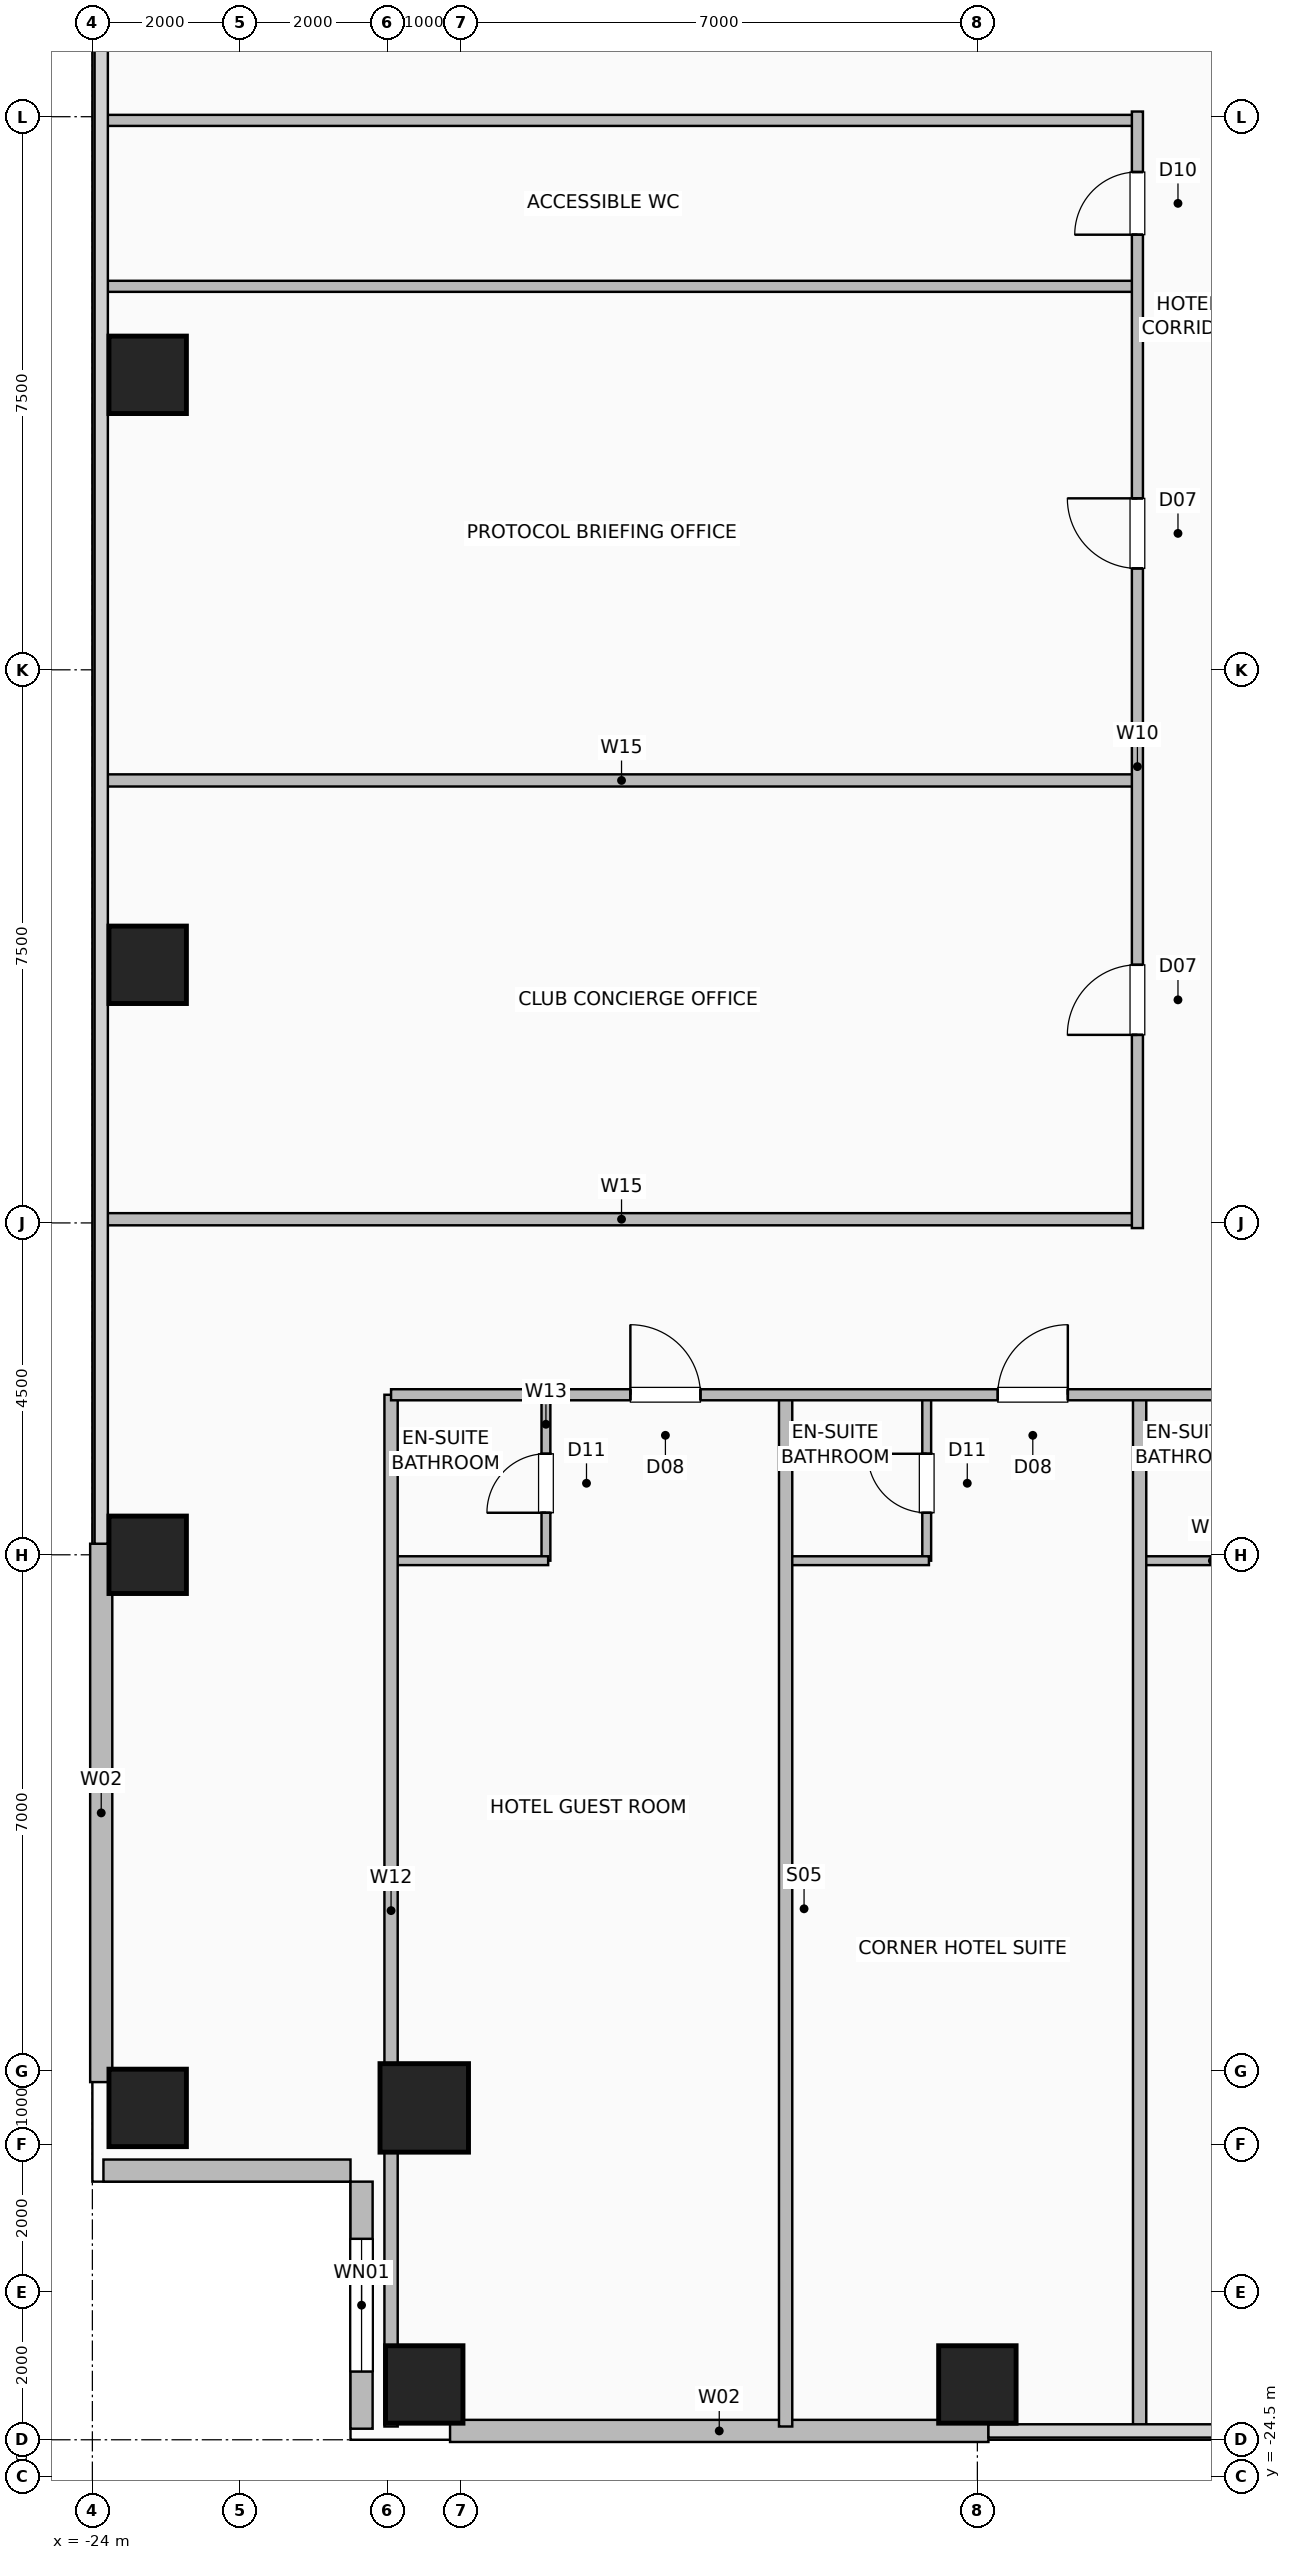
"""IFC4 building model, lengths in metres.
Left out: names, types, materials, properties, quantities, classifications, styles, units other than length and angle.
Written with IfcOpenShell. Run it as: python <this file> out.ifc"""

import sys

from ifc_helpers import new_model, si_unit, direction, frame, frame_2d, origin, origin_2d, place, context, subcontext, project, spatial, rectangle, hollow_rectangle, extrude, element, fill, save


model = new_model("IFC4")
c1 = context("Model", 3, precision=1e-05, world=origin(), true_north=direction((0.0, 1.0)))
c2 = subcontext(c1, "Body", "Model", "MODEL_VIEW")
j1 = project(units=[si_unit("LENGTHUNIT", "METRE"), si_unit("PLANEANGLEUNIT", "RADIAN")], contexts=[c1])
p1 = place(None, origin())
s1 = spatial("IfcSite", under=j1, at=p1, CompositionType="ELEMENT")
p2 = place(p1, origin())
s2 = spatial("IfcBuilding", under=s1, at=p2, CompositionType="ELEMENT")
p3 = place(p2, frame((0.0, 0.0, 65.5)))
s3 = spatial("IfcBuildingStorey", under=s2, at=p3, CompositionType="ELEMENT", Elevation=65.5)
for number, where, z_axis, x_axis in (
    (1, (-19.5, -23.25, 0.0), (0.0, 0.0, 1.0), (1.0, 0.0, 0.0)),
    (2, (-23.25, -19.5, 0.0), (0.0, 0.0, 1.0), (1.0, 0.0, 0.0)),
    (3, (-12.0, -23.25, 0.0), (0.0, 0.0, 1.0), (1.0, 0.0, 0.0)),
    (4, (-23.25, -12.0, 0.0), (0.0, 0.0, 1.0), (1.0, 0.0, 0.0)),
    (5, (-23.25, -4.0, 0.0), (0.0, 0.0, 1.0), (1.0, 0.0, 0.0)),
    (6, (-23.25, 4.0, 0.0), (0.0, 0.0, 1.0), (1.0, 0.0, 0.0)),
):
    element("IfcColumn", number, at=place(p3, frame(where, z_axis=z_axis, x_axis=x_axis)), inside=s3, PredefinedType="COLUMN", context=c2, shape_type="SweptSolid", body=[
        extrude(hollow_rectangle(XDim=1.05, YDim=1.05, WallThickness=0.05, at=origin_2d()), origin(), (0.0, 0.0, 1.0), 3.5),
    ])
p4 = place(p3, frame((-19.5, -19.5, 0.0), z_axis=(0.0, 0.0, 1.0), x_axis=(1.0, 0.0, 0.0)))
e7 = element("IfcColumn", 7, at=p4, inside=s3, PredefinedType="COLUMN", context=c2, shape_type="SweptSolid", body=[
    extrude(hollow_rectangle(XDim=1.2, YDim=1.2, WallThickness=0.055, at=origin_2d()), origin(), (0.0, 0.0, 1.0), 3.5),
])
for number, where, z_axis, x_axis in (
    (8, (-19.15, -23.88, 0.0), (0.0, 0.0, 1.0), (1.0, 0.0, 0.0)),
    (9, (-23.88, -19.15, 0.0), (0.0, 0.0, 1.0), (0.0, 1.0, 0.0)),
):
    element("IfcWall", number, at=place(p3, frame(where, z_axis=z_axis, x_axis=x_axis)), inside=s3, PredefinedType="SOLIDWALL", context=c2, shape_type="SweptSolid", body=[
        extrude(rectangle(XDim=7.3, YDim=0.3, at=frame_2d((3.65, 0.0))), origin(), (0.0, 0.0, 1.0), 3.25),
    ])
p5 = place(p3, frame((-20.35, -23.85, 0.0), z_axis=(0.0, 0.0, 1.0), x_axis=(0.0, 1.0, 0.0)))
e10 = element("IfcWall", 10, at=p5, inside=s3, PredefinedType="SOLIDWALL", context=c2, shape_type="SweptSolid", body=[
    extrude(rectangle(XDim=3.35, YDim=0.3, at=frame_2d((1.675, 0.0))), origin(), (0.0, 0.0, 1.0), 3.25),
])
p6 = place(p5, frame((0.775, 0.0, 0.9)))
e11 = element("IfcOpeningElement", 11, at=p6, cuts=e10, PredefinedType="OPENING", context=c2, shape_type="SweptSolid", body=[
    extrude(rectangle(XDim=1.8, YDim=1.8, at=frame_2d((0.9, 0.9))), frame((0.0, 0.16, 0.0), z_axis=(0.0, -1.0, 0.0), x_axis=(1.0, 0.0, 0.0)), (0.0, 0.0, 1.0), 0.32),
])
p7 = place(p3, frame((-23.85, -20.35, 0.0), z_axis=(0.0, 0.0, 1.0), x_axis=(1.0, 0.0, 0.0)))
e12 = element("IfcWall", 12, at=p7, inside=s3, PredefinedType="SOLIDWALL", context=c2, shape_type="SweptSolid", body=[
    extrude(rectangle(XDim=3.35, YDim=0.3, at=frame_2d((1.675, 0.0))), origin(), (0.0, 0.0, 1.0), 3.25),
])
p8 = place(p3, frame((-17.85, -12.08, 0.0), z_axis=(0.0, 0.0, 1.0), x_axis=(0.0, 1.0, 0.0)))
e13 = element("IfcWall", 13, at=p8, inside=s3, PredefinedType="PLUMBINGWALL", context=c2, shape_type="SweptSolid", body=[
    extrude(rectangle(XDim=2.25, YDim=0.12, at=frame_2d((1.125, 0.0))), origin(), (0.0, 0.0, 1.0), 3.25),
])
p9 = place(p8, frame((0.65, 0.0, 0.0)))
e14 = element("IfcOpeningElement", 14, at=p9, cuts=e13, PredefinedType="OPENING", context=c2, shape_type="SweptSolid", body=[
    extrude(rectangle(XDim=0.8, YDim=2.05, at=frame_2d((0.4, 1.025))), frame((0.0, 0.07, 0.0), z_axis=(0.0, -1.0, 0.0), x_axis=(1.0, 0.0, 0.0)), (0.0, 0.0, 1.0), 0.14),
])
p10 = place(p3, frame((-19.92, -12.08, 0.0), z_axis=(0.0, 0.0, 1.0), x_axis=(1.0, 0.0, 0.0)))
e15 = element("IfcWall", 15, at=p10, inside=s3, PredefinedType="PLUMBINGWALL", context=c2, shape_type="SweptSolid", body=[
    extrude(rectangle(XDim=2.1, YDim=0.12, at=frame_2d((1.05, 0.0))), origin(), (0.0, 0.0, 1.0), 3.25),
])
p11 = place(p3, frame((-12.687, -12.08, 0.0), z_axis=(0.0, 0.0, 1.0), x_axis=(0.0, 1.0, 0.0)))
e16 = element("IfcWall", 16, at=p11, inside=s3, PredefinedType="PLUMBINGWALL", context=c2, shape_type="SweptSolid", body=[
    extrude(rectangle(XDim=2.25, YDim=0.12, at=frame_2d((1.125, 0.0))), origin(), (0.0, 0.0, 1.0), 3.25),
])
p12 = place(p11, frame((0.65, 0.0, 0.0)))
e17 = element("IfcOpeningElement", 17, at=p12, cuts=e16, PredefinedType="OPENING", context=c2, shape_type="SweptSolid", body=[
    extrude(rectangle(XDim=0.8, YDim=2.05, at=frame_2d((0.4, 1.025))), frame((0.0, 0.07, 0.0), z_axis=(0.0, -1.0, 0.0), x_axis=(1.0, 0.0, 0.0)), (0.0, 0.0, 1.0), 0.14),
])
for number, where, z_axis, x_axis in (
    (18, (-14.57, -12.08, 0.0), (0.0, 0.0, 1.0), (1.0, 0.0, 0.0)),
    (19, (-9.77, -12.08, 0.0), (0.0, 0.0, 1.0), (1.0, 0.0, 0.0)),
):
    element("IfcWall", number, at=place(p3, frame(where, z_axis=z_axis, x_axis=x_axis)), inside=s3, PredefinedType="PLUMBINGWALL", context=c2, shape_type="SweptSolid", body=[
        extrude(rectangle(XDim=1.913, YDim=0.12, at=frame_2d((0.957, 0.0))), origin(), (0.0, 0.0, 1.0), 3.25),
    ])
for number, where, z_axis, x_axis in (
    (20, (-19.95, -23.82, 0.0), (0.0, 0.0, 1.0), (0.0, 1.0, 0.0)),
    (21, (-14.6, -23.82, 0.0), (0.0, 0.0, 1.0), (0.0, 1.0, 0.0)),
    (22, (-9.8, -23.82, 0.0), (0.0, 0.0, 1.0), (0.0, 1.0, 0.0)),
):
    element("IfcWall", number, at=place(p3, frame(where, z_axis=z_axis, x_axis=x_axis)), inside=s3, PredefinedType="PARTITIONING", context=c2, shape_type="SweptSolid", body=[
        extrude(rectangle(XDim=13.99, YDim=0.18, at=frame_2d((6.995, 0.0))), origin(), (0.0, 0.0, 1.0), 3.25),
    ])
p13 = place(p3, frame((-19.95, -9.83, 0.0), z_axis=(0.0, 0.0, 1.0), x_axis=(1.0, 0.0, 0.0)))
e23 = element("IfcWall", 23, at=p13, inside=s3, PredefinedType="PARTITIONING", context=c2, shape_type="SweptSolid", body=[
    extrude(rectangle(XDim=39.9, YDim=0.15, at=frame_2d((19.95, 0.0))), origin(), (0.0, 0.0, 1.0), 3.25),
])
p14 = place(p13, frame((3.245, 0.0, 0.0)))
e24 = element("IfcOpeningElement", 24, at=p14, cuts=e23, PredefinedType="OPENING", context=c2, shape_type="SweptSolid", body=[
    extrude(rectangle(XDim=0.95, YDim=2.08, at=frame_2d((0.475, 1.04))), frame((0.0, 0.085, 0.0), z_axis=(0.0, -1.0, 0.0), x_axis=(1.0, 0.0, 0.0)), (0.0, 0.0, 1.0), 0.17),
])
p15 = place(p13, frame((8.227, 0.0, 0.0)))
e25 = element("IfcOpeningElement", 25, at=p15, cuts=e23, PredefinedType="OPENING", context=c2, shape_type="SweptSolid", body=[
    extrude(rectangle(XDim=0.95, YDim=2.08, at=frame_2d((0.475, 1.04))), frame((0.0, 0.085, 0.0), z_axis=(0.0, -1.0, 0.0), x_axis=(1.0, 0.0, 0.0)), (0.0, 0.0, 1.0), 0.17),
])
p16 = place(p13, frame((13.027, 0.0, 0.0)))
e26 = element("IfcOpeningElement", 26, at=p16, cuts=e23, PredefinedType="OPENING", context=c2, shape_type="SweptSolid", body=[
    extrude(rectangle(XDim=0.95, YDim=2.08, at=frame_2d((0.475, 1.04))), frame((0.0, 0.085, 0.0), z_axis=(0.0, -1.0, 0.0), x_axis=(1.0, 0.0, 0.0)), (0.0, 0.0, 1.0), 0.17),
])
p17 = place(p13, frame((16.861, 0.0, 0.0)))
e27 = element("IfcOpeningElement", 27, at=p17, cuts=e23, PredefinedType="OPENING", context=c2, shape_type="SweptSolid", body=[
    extrude(rectangle(XDim=0.95, YDim=2.08, at=frame_2d((0.475, 1.04))), frame((0.0, 0.085, 0.0), z_axis=(0.0, -1.0, 0.0), x_axis=(1.0, 0.0, 0.0)), (0.0, 0.0, 1.0), 0.17),
])
p18 = place(p13, frame((22.02, 0.0, 0.0)))
e28 = element("IfcOpeningElement", 28, at=p18, cuts=e23, PredefinedType="OPENING", context=c2, shape_type="SweptSolid", body=[
    extrude(rectangle(XDim=0.95, YDim=2.08, at=frame_2d((0.475, 1.04))), frame((0.0, 0.085, 0.0), z_axis=(0.0, -1.0, 0.0), x_axis=(1.0, 0.0, 0.0)), (0.0, 0.0, 1.0), 0.17),
])
p19 = place(p13, frame((27.427, 0.0, 0.0)))
e29 = element("IfcOpeningElement", 29, at=p19, cuts=e23, PredefinedType="OPENING", context=c2, shape_type="SweptSolid", body=[
    extrude(rectangle(XDim=0.95, YDim=2.08, at=frame_2d((0.475, 1.04))), frame((0.0, 0.085, 0.0), z_axis=(0.0, -1.0, 0.0), x_axis=(1.0, 0.0, 0.0)), (0.0, 0.0, 1.0), 0.17),
])
p20 = place(p13, frame((32.365, 0.0, 0.0)))
e30 = element("IfcOpeningElement", 30, at=p20, cuts=e23, PredefinedType="OPENING", context=c2, shape_type="SweptSolid", body=[
    extrude(rectangle(XDim=0.95, YDim=2.08, at=frame_2d((0.475, 1.04))), frame((0.0, 0.085, 0.0), z_axis=(0.0, -1.0, 0.0), x_axis=(1.0, 0.0, 0.0)), (0.0, 0.0, 1.0), 0.17),
])
p21 = place(p13, frame((37.695, 0.0, 0.0)))
e31 = element("IfcOpeningElement", 31, at=p21, cuts=e23, PredefinedType="OPENING", context=c2, shape_type="SweptSolid", body=[
    extrude(rectangle(XDim=0.95, YDim=2.08, at=frame_2d((0.475, 1.04))), frame((0.0, 0.085, 0.0), z_axis=(0.0, -1.0, 0.0), x_axis=(1.0, 0.0, 0.0)), (0.0, 0.0, 1.0), 0.17),
])
for number, where, z_axis, x_axis in (
    (32, (-23.82, -7.45, 0.0), (0.0, 0.0, 1.0), (1.0, 0.0, 0.0)),
    (33, (-23.82, -1.5, 0.0), (0.0, 0.0, 1.0), (1.0, 0.0, 0.0)),
):
    element("IfcWall", number, at=place(p3, frame(where, z_axis=z_axis, x_axis=x_axis)), inside=s3, PredefinedType="PLUMBINGWALL", context=c2, shape_type="SweptSolid", body=[
        extrude(rectangle(XDim=13.99, YDim=0.165, at=frame_2d((6.995, 0.0))), origin(), (0.0, 0.0, 1.0), 3.25),
    ])
for number, where, z_axis, x_axis in (
    (34, (-23.82, 5.2, 0.0), (0.0, 0.0, 1.0), (1.0, 0.0, 0.0)),
    (35, (-23.82, 7.45, 0.0), (0.0, 0.0, 1.0), (1.0, 0.0, 0.0)),
):
    element("IfcWall", number, at=place(p3, frame(where, z_axis=z_axis, x_axis=x_axis)), inside=s3, PredefinedType="PARTITIONING", context=c2, shape_type="SweptSolid", body=[
        extrude(rectangle(XDim=13.99, YDim=0.15, at=frame_2d((6.995, 0.0))), origin(), (0.0, 0.0, 1.0), 3.25),
    ])
p22 = place(p3, frame((-9.83, -7.57, 0.0), z_axis=(0.0, 0.0, 1.0), x_axis=(0.0, 1.0, 0.0)))
e36 = element("IfcWall", 36, at=p22, inside=s3, PredefinedType="PARTITIONING", context=c2, shape_type="SweptSolid", body=[
    extrude(rectangle(XDim=15.14, YDim=0.15, at=frame_2d((7.57, 0.0))), origin(), (0.0, 0.0, 1.0), 3.25),
])
p23 = place(p22, frame((2.62, 0.0, 0.0)))
e37 = element("IfcOpeningElement", 37, at=p23, cuts=e36, PredefinedType="OPENING", context=c2, shape_type="SweptSolid", body=[
    extrude(rectangle(XDim=0.95, YDim=2.06, at=frame_2d((0.475, 1.03))), frame((0.0, 0.085, 0.0), z_axis=(0.0, -1.0, 0.0), x_axis=(1.0, 0.0, 0.0)), (0.0, 0.0, 1.0), 0.17),
])
p24 = place(p22, frame((8.945, 0.0, 0.0)))
e38 = element("IfcOpeningElement", 38, at=p24, cuts=e36, PredefinedType="OPENING", context=c2, shape_type="SweptSolid", body=[
    extrude(rectangle(XDim=0.95, YDim=2.06, at=frame_2d((0.475, 1.03))), frame((0.0, 0.085, 0.0), z_axis=(0.0, -1.0, 0.0), x_axis=(1.0, 0.0, 0.0)), (0.0, 0.0, 1.0), 0.17),
])
p25 = place(p22, frame((13.47, 0.0, 0.0)))
e39 = element("IfcOpeningElement", 39, at=p25, cuts=e36, PredefinedType="OPENING", context=c2, shape_type="SweptSolid", body=[
    extrude(rectangle(XDim=0.85, YDim=2.05, at=frame_2d((0.425, 1.025))), frame((0.0, 0.085, 0.0), z_axis=(0.0, -1.0, 0.0), x_axis=(1.0, 0.0, 0.0)), (0.0, 0.0, 1.0), 0.17),
])
p26 = place(p6, origin())
e40 = element("IfcWindow", 40, at=p26, inside=s3, PartitioningType="SINGLE_PANEL", PredefinedType="WINDOW", context=c2, shape_type="SweptSolid", body=[
    extrude(rectangle(XDim=1.8, YDim=1.8, at=frame_2d((0.9, 0.9))), frame((0.0, 0.03, 0.0), z_axis=(0.0, -1.0, 0.0), x_axis=(1.0, 0.0, 0.0)), (0.0, 0.0, 1.0), 0.06),
])
fill(e11, e40)
p27 = place(p9, origin())
e41 = element("IfcDoor", 41, at=p27, inside=s3, OperationType="SINGLE_SWING_LEFT", PredefinedType="DOOR", context=c2, shape_type="SweptSolid", body=[
    extrude(rectangle(XDim=0.8, YDim=2.05, at=frame_2d((0.4, 1.025))), frame((0.0, 0.025, 0.0), z_axis=(0.0, -1.0, 0.0), x_axis=(1.0, 0.0, 0.0)), (0.0, 0.0, 1.0), 0.05),
])
fill(e14, e41)
p28 = place(p12, origin())
e42 = element("IfcDoor", 42, at=p28, inside=s3, OperationType="SINGLE_SWING_RIGHT", PredefinedType="DOOR", context=c2, shape_type="SweptSolid", body=[
    extrude(rectangle(XDim=0.8, YDim=2.05, at=frame_2d((0.4, 1.025))), frame((0.0, 0.025, 0.0), z_axis=(0.0, -1.0, 0.0), x_axis=(1.0, 0.0, 0.0)), (0.0, 0.0, 1.0), 0.05),
])
fill(e17, e42)
p29 = place(p14, origin())
e43 = element("IfcDoor", 43, at=p29, inside=s3, OperationType="SINGLE_SWING_LEFT", PredefinedType="DOOR", context=c2, shape_type="SweptSolid", body=[
    extrude(rectangle(XDim=0.95, YDim=2.08, at=frame_2d((0.475, 1.04))), frame((0.0, 0.025, 0.0), z_axis=(0.0, -1.0, 0.0), x_axis=(1.0, 0.0, 0.0)), (0.0, 0.0, 1.0), 0.05),
])
fill(e24, e43)
p30 = place(p15, origin())
e44 = element("IfcDoor", 44, at=p30, inside=s3, OperationType="SINGLE_SWING_RIGHT", PredefinedType="DOOR", context=c2, shape_type="SweptSolid", body=[
    extrude(rectangle(XDim=0.95, YDim=2.08, at=frame_2d((0.475, 1.04))), frame((0.0, 0.025, 0.0), z_axis=(0.0, -1.0, 0.0), x_axis=(1.0, 0.0, 0.0)), (0.0, 0.0, 1.0), 0.05),
])
fill(e25, e44)
p31 = place(p23, origin())
e45 = element("IfcDoor", 45, at=p31, inside=s3, OperationType="SINGLE_SWING_LEFT", PredefinedType="DOOR", context=c2, shape_type="SweptSolid", body=[
    extrude(rectangle(XDim=0.95, YDim=2.06, at=frame_2d((0.475, 1.03))), frame((0.0, 0.025, 0.0), z_axis=(0.0, -1.0, 0.0), x_axis=(1.0, 0.0, 0.0)), (0.0, 0.0, 1.0), 0.05),
])
fill(e37, e45)
p32 = place(p24, origin())
e46 = element("IfcDoor", 46, at=p32, inside=s3, OperationType="SINGLE_SWING_RIGHT", PredefinedType="DOOR", context=c2, shape_type="SweptSolid", body=[
    extrude(rectangle(XDim=0.95, YDim=2.06, at=frame_2d((0.475, 1.03))), frame((0.0, 0.025, 0.0), z_axis=(0.0, -1.0, 0.0), x_axis=(1.0, 0.0, 0.0)), (0.0, 0.0, 1.0), 0.05),
])
fill(e38, e46)
p33 = place(p25, origin())
e47 = element("IfcDoor", 47, at=p33, inside=s3, OperationType="SINGLE_SWING_LEFT", PredefinedType="DOOR", context=c2, shape_type="SweptSolid", body=[
    extrude(rectangle(XDim=0.85, YDim=2.05, at=frame_2d((0.425, 1.025))), frame((0.0, 0.025, 0.0), z_axis=(0.0, -1.0, 0.0), x_axis=(1.0, 0.0, 0.0)), (0.0, 0.0, 1.0), 0.05),
])
fill(e39, e47)
save(model, sys.argv[1])
